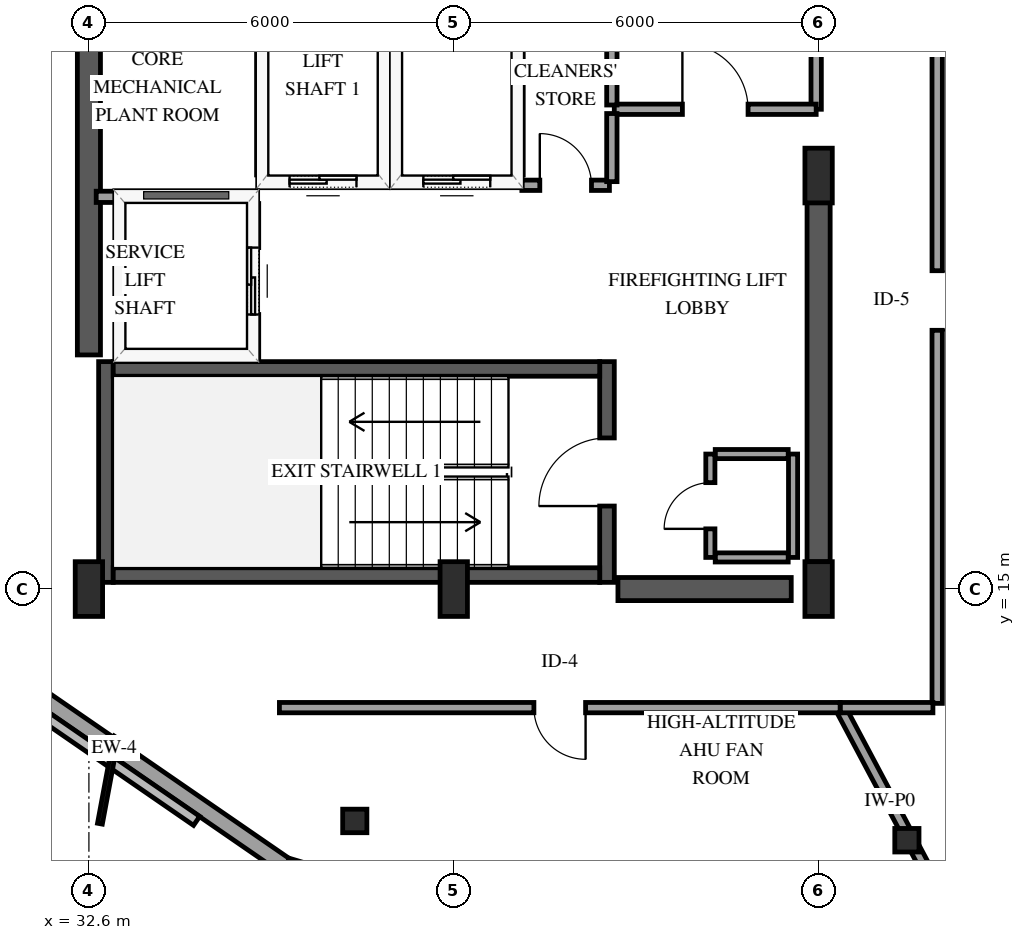
"""IFC4 building model, lengths in metres.
Left out: names, types, materials, properties, quantities, classifications, styles, units other than length and angle.
Written with IfcOpenShell. Run it as: python <this file> out.ifc"""

import sys

from ifc_helpers import new_model, si_unit, direction, frame, frame_2d, origin, origin_2d, place, context, subcontext, project, spatial, rectangle, i_section, extrude, element, fill, save


model = new_model("IFC4")
c1 = context("Model", 3, precision=1e-05, world=origin(), true_north=direction((0.0, 1.0)))
c2 = subcontext(c1, "Body", "Model", "MODEL_VIEW")
j1 = project(units=[si_unit("LENGTHUNIT", "METRE"), si_unit("PLANEANGLEUNIT", "RADIAN")], contexts=[c1])
p1 = place(None, origin())
s1 = spatial("IfcSite", under=j1, at=p1, CompositionType="ELEMENT")
p2 = place(p1, origin())
s2 = spatial("IfcBuilding", under=s1, at=p2, CompositionType="ELEMENT")
p3 = place(p2, frame((0.0, 0.0, 305.65)))
s3 = spatial("IfcBuildingStorey", under=s2, at=p3, CompositionType="ELEMENT", Elevation=305.65)
p4 = place(p3, frame((32.88, 15.11, 0.0), z_axis=(0.0, 0.0, 1.0), x_axis=(0.0, 1.0, 0.0)))
e1 = element("IfcWall", 1, at=p4, inside=s3, PredefinedType="SHEAR", context=c2, shape_type="SweptSolid", body=[
    extrude(rectangle(XDim=3.63, YDim=0.24, at=frame_2d((1.815, 0.0))), origin(), (0.0, 0.0, 1.0), 4.2),
])
p5 = place(p3, frame((41.12, 15.11, 0.0), z_axis=(0.0, 0.0, 1.0), x_axis=(0.0, 1.0, 0.0)))
e2 = element("IfcWall", 2, at=p5, inside=s3, PredefinedType="SHEAR", context=c2, shape_type="SweptSolid", body=[
    extrude(rectangle(XDim=3.63, YDim=0.24, at=frame_2d((1.815, 0.0))), origin(), (0.0, 0.0, 1.0), 4.2),
])
p6 = place(p5, frame((1.255, 0.0, 0.0)))
e3 = element("IfcOpeningElement", 3, at=p6, cuts=e2, PredefinedType="OPENING", context=c2, shape_type="SweptSolid", body=[
    extrude(rectangle(XDim=1.12, YDim=2.15, at=frame_2d((0.56, 1.075))), frame((0.0, 0.13, 0.0), z_axis=(0.0, -1.0, 0.0), x_axis=(1.0, 0.0, 0.0)), (0.0, 0.0, 1.0), 0.26),
])
for number, where, z_axis, x_axis in (
    (4, (33.0, 15.23, 0.0), (0.0, 0.0, 1.0), (1.0, 0.0, 0.0)),
    (5, (33.0, 18.62, 0.0), (0.0, 0.0, 1.0), (1.0, 0.0, 0.0)),
):
    element("IfcWall", number, at=place(p3, frame(where, z_axis=z_axis, x_axis=x_axis)), inside=s3, PredefinedType="SHEAR", context=c2, shape_type="SweptSolid", body=[
        extrude(rectangle(XDim=8.0, YDim=0.24, at=frame_2d((4.0, 0.0))), origin(), (0.0, 0.0, 1.0), 4.2),
    ])
p7 = place(p3, frame((32.6, 18.85, 0.0), z_axis=(0.0, 0.0, 1.0), x_axis=(0.0, 1.0, 0.0)))
e6 = element("IfcWall", 6, at=p7, inside=s3, PredefinedType="SHEAR", context=c2, shape_type="SweptSolid", body=[
    extrude(rectangle(XDim=12.3, YDim=0.38, at=frame_2d((6.15, 0.0))), origin(), (0.0, 0.0, 1.0), 4.2),
])
p8 = place(p3, frame((41.3, 15.0, 0.0), z_axis=(0.0, 0.0, 1.0), x_axis=(1.0, 0.0, 0.0)))
e7 = element("IfcWall", 7, at=p8, inside=s3, PredefinedType="SHEAR", context=c2, shape_type="SweptSolid", body=[
    extrude(rectangle(XDim=2.85, YDim=0.38, at=frame_2d((1.425, 0.0))), origin(), (0.0, 0.0, 1.0), 4.2),
])
p9 = place(p3, frame((44.6, 15.45, 0.0), z_axis=(0.0, 0.0, 1.0), x_axis=(0.0, 1.0, 0.0)))
e8 = element("IfcWall", 8, at=p9, inside=s3, PredefinedType="SHEAR", context=c2, shape_type="SweptSolid", body=[
    extrude(rectangle(XDim=6.35, YDim=0.38, at=frame_2d((3.175, 0.0))), origin(), (0.0, 0.0, 1.0), 4.2),
])
for number, where, z_axis, x_axis in (
    (9, (32.6, 15.0, 0.0), (0.0, 0.0, 1.0), (1.0, 0.0, 0.0)),
    (10, (38.6, 15.0, 0.0), (0.0, 0.0, 1.0), (1.0, 0.0, 0.0)),
    (11, (44.6, 15.0, 0.0), (0.0, 0.0, 1.0), (1.0, 0.0, 0.0)),
    (12, (44.6, 21.8, 0.0), (0.0, 0.0, 1.0), (1.0, 0.0, 0.0)),
):
    element("IfcColumn", number, at=place(p3, frame(where, z_axis=z_axis, x_axis=x_axis)), inside=s3, PredefinedType="PILASTER", context=c2, shape_type="SweptSolid", body=[
        extrude(rectangle(XDim=0.45, YDim=0.9, at=origin_2d()), origin(), (0.0, 0.0, 1.0), 4.2),
    ])
for number, where, z_axis, x_axis in (
    (13, (36.972, 11.187, 0.0), (0.0, 0.0, 1.0), (1.0, 0.0, 0.0)),
    (14, (46.052, 10.869, 0.0), (0.0, 0.0, 1.0), (1.0, 0.0, 0.0)),
):
    element("IfcColumn", number, at=place(p3, frame(where, z_axis=z_axis, x_axis=x_axis)), inside=s3, PredefinedType="COLUMN", context=c2, shape_type="SweptSolid", body=[
        extrude(i_section(OverallWidth=0.398, OverallDepth=0.387, WebThickness=0.021, FlangeThickness=0.033, FilletRadius=0.038, at=origin_2d()), origin(), (0.0, 0.0, 1.0), 4.2),
    ])
p10 = place(p3, frame((35.827, 10.452, 0.0), z_axis=(0.0, 0.0, 1.0), x_axis=(0.958527849857, -0.284998879029, 0.0)))
e15 = element("IfcWall", 15, at=p10, inside=s3, PredefinedType="SOLIDWALL", context=c2, shape_type="SweptSolid", body=[
    extrude(rectangle(XDim=2.967, YDim=0.27, at=frame_2d((1.483, 0.0))), origin(), (0.0, 0.0, 1.0), 3.195),
])
p11 = place(p3, frame((30.201, 14.328, 0.0), z_axis=(0.0, 0.0, 1.0), x_axis=(0.823525410079, -0.567279383509, 0.0)))
e16 = element("IfcWall", 16, at=p11, inside=s3, PredefinedType="SOLIDWALL", context=c2, shape_type="SweptSolid", body=[
    extrude(rectangle(XDim=6.831, YDim=0.27, at=frame_2d((3.416, 0.0))), origin(), (0.0, 0.0, 1.0), 3.195),
])
p12 = place(p3, frame((45.499, 9.779, 0.0), z_axis=(0.0, 0.0, 1.0), x_axis=(0.942990333583, 0.332820117735, 0.0)))
e17 = element("IfcWall", 17, at=p12, inside=s3, PredefinedType="SOLIDWALL", context=c2, shape_type="SweptSolid", body=[
    extrude(rectangle(XDim=2.967, YDim=0.27, at=frame_2d((1.483, 0.0))), origin(), (0.0, 0.0, 1.0), 3.195),
])
p13 = place(p3, frame((35.45, 21.7, 0.0), z_axis=(0.0, 0.0, 1.0), x_axis=(1.0, 0.0, 0.0)))
e18 = element("IfcWall", 18, at=p13, inside=s3, PredefinedType="SOLIDWALL", context=c2, shape_type="SweptSolid", body=[
    extrude(rectangle(XDim=2.0, YDim=0.185, at=frame_2d((1.0, 0.0))), origin(), (0.0, 0.0, 1.0), 3.895),
])
p14 = place(p13, frame((0.45, 0.0, 0.0)))
e19 = element("IfcOpeningElement", 19, at=p14, cuts=e18, PredefinedType="OPENING", context=c2, shape_type="SweptSolid", body=[
    extrude(rectangle(XDim=1.1, YDim=2.15, at=frame_2d((0.55, 1.075))), frame((0.0, 0.103, 0.0), z_axis=(0.0, -1.0, 0.0), x_axis=(1.0, 0.0, 0.0)), (0.0, 0.0, 1.0), 0.205),
])
for number, where, z_axis, x_axis in (
    (20, (35.45, 21.81, 0.0), (0.0, 0.0, 1.0), (0.0, 1.0, 0.0)),
    (21, (37.45, 21.81, 0.0), (0.0, 0.0, 1.0), (0.0, 1.0, 0.0)),
):
    element("IfcWall", number, at=place(p3, frame(where, z_axis=z_axis, x_axis=x_axis)), inside=s3, PredefinedType="SOLIDWALL", context=c2, shape_type="SweptSolid", body=[
        extrude(rectangle(XDim=2.38, YDim=0.185, at=frame_2d((1.19, 0.0))), origin(), (0.0, 0.0, 1.0), 3.895),
    ])
p15 = place(p3, frame((37.65, 21.7, 0.0), z_axis=(0.0, 0.0, 1.0), x_axis=(1.0, 0.0, 0.0)))
e22 = element("IfcWall", 22, at=p15, inside=s3, PredefinedType="SOLIDWALL", context=c2, shape_type="SweptSolid", body=[
    extrude(rectangle(XDim=2.0, YDim=0.185, at=frame_2d((1.0, 0.0))), origin(), (0.0, 0.0, 1.0), 3.895),
])
p16 = place(p15, frame((0.45, 0.0, 0.0)))
e23 = element("IfcOpeningElement", 23, at=p16, cuts=e22, PredefinedType="OPENING", context=c2, shape_type="SweptSolid", body=[
    extrude(rectangle(XDim=1.1, YDim=2.15, at=frame_2d((0.55, 1.075))), frame((0.0, 0.103, 0.0), z_axis=(0.0, -1.0, 0.0), x_axis=(1.0, 0.0, 0.0)), (0.0, 0.0, 1.0), 0.205),
])
p17 = place(p3, frame((39.65, 21.81, 0.0), z_axis=(0.0, 0.0, 1.0), x_axis=(0.0, 1.0, 0.0)))
e24 = element("IfcWall", 24, at=p17, inside=s3, PredefinedType="SOLIDWALL", context=c2, shape_type="SweptSolid", body=[
    extrude(rectangle(XDim=2.38, YDim=0.185, at=frame_2d((1.19, 0.0))), origin(), (0.0, 0.0, 1.0), 3.895),
])
p18 = place(p3, frame((32.72, 21.45, 0.0), z_axis=(0.0, 0.0, 1.0), x_axis=(1.0, 0.0, 0.0)))
e25 = element("IfcWall", 25, at=p18, inside=s3, PredefinedType="SOLIDWALL", context=c2, shape_type="SweptSolid", body=[
    extrude(rectangle(XDim=2.58, YDim=0.185, at=frame_2d((1.29, 0.0))), origin(), (0.0, 0.0, 1.0), 3.895),
])
p19 = place(p3, frame((35.3, 18.79, 0.0), z_axis=(0.0, 0.0, 1.0), x_axis=(0.0, 1.0, 0.0)))
e26 = element("IfcWall", 26, at=p19, inside=s3, PredefinedType="SOLIDWALL", context=c2, shape_type="SweptSolid", body=[
    extrude(rectangle(XDim=2.55, YDim=0.185, at=frame_2d((1.275, 0.0))), origin(), (0.0, 0.0, 1.0), 3.895),
])
p20 = place(p19, frame((0.725, 0.0, 0.0)))
e27 = element("IfcOpeningElement", 27, at=p20, cuts=e26, PredefinedType="OPENING", context=c2, shape_type="SweptSolid", body=[
    extrude(rectangle(XDim=1.1, YDim=2.15, at=frame_2d((0.55, 1.075))), frame((0.0, 0.103, 0.0), z_axis=(0.0, -1.0, 0.0), x_axis=(1.0, 0.0, 0.0)), (0.0, 0.0, 1.0), 0.205),
])
for number, where, z_axis, x_axis in (
    (28, (42.9, 15.52, 0.0), (0.0, 0.0, 1.0), (1.0, 0.0, 0.0)),
    (29, (42.9, 17.22, 0.0), (0.0, 0.0, 1.0), (1.0, 0.0, 0.0)),
):
    element("IfcWall", number, at=place(p3, frame(where, z_axis=z_axis, x_axis=x_axis)), inside=s3, PredefinedType="PARTITIONING", context=c2, shape_type="SweptSolid", body=[
        extrude(rectangle(XDim=1.2, YDim=0.15, at=frame_2d((0.6, 0.0))), origin(), (0.0, 0.0, 1.0), 3.895),
    ])
p21 = place(p3, frame((44.18, 15.52, 0.0), z_axis=(0.0, 0.0, 1.0), x_axis=(0.0, 1.0, 0.0)))
e30 = element("IfcWall", 30, at=p21, inside=s3, PredefinedType="PARTITIONING", context=c2, shape_type="SweptSolid", body=[
    extrude(rectangle(XDim=1.7, YDim=0.15, at=frame_2d((0.85, 0.0))), origin(), (0.0, 0.0, 1.0), 3.895),
])
p22 = place(p3, frame((42.82, 15.52, 0.0), z_axis=(0.0, 0.0, 1.0), x_axis=(0.0, 1.0, 0.0)))
e31 = element("IfcWall", 31, at=p22, inside=s3, PredefinedType="PARTITIONING", context=c2, shape_type="SweptSolid", body=[
    extrude(rectangle(XDim=1.7, YDim=0.15, at=frame_2d((0.85, 0.0))), origin(), (0.0, 0.0, 1.0), 3.895),
])
p23 = place(p22, frame((0.47, 0.0, 0.0)))
e32 = element("IfcOpeningElement", 32, at=p23, cuts=e31, PredefinedType="OPENING", context=c2, shape_type="SweptSolid", body=[
    extrude(rectangle(XDim=0.76, YDim=2.0, at=frame_2d((0.38, 1.0))), frame((0.0, 0.085, 0.0), z_axis=(0.0, -1.0, 0.0), x_axis=(1.0, 0.0, 0.0)), (0.0, 0.0, 1.0), 0.17),
])
p24 = place(p3, frame((46.55, 26.401, 0.0), z_axis=(0.0, 0.0, 1.0), x_axis=(0.0, -1.0, 0.0)))
e33 = element("IfcWall", 33, at=p24, inside=s3, PredefinedType="PARTITIONING", context=c2, shape_type="SweptSolid", body=[
    extrude(rectangle(XDim=13.281, YDim=0.17, at=frame_2d((6.64, 0.0))), origin(), (0.0, 0.0, 1.0), 3.895),
])
p25 = place(p24, frame((6.166, 0.0, 0.0)))
e34 = element("IfcOpeningElement", 34, at=p25, cuts=e33, PredefinedType="OPENING", context=c2, shape_type="SweptSolid", body=[
    extrude(rectangle(XDim=0.98, YDim=2.15, at=frame_2d((0.49, 1.075))), frame((0.0, 0.095, 0.0), z_axis=(0.0, -1.0, 0.0), x_axis=(1.0, 0.0, 0.0)), (0.0, 0.0, 1.0), 0.19),
])
p26 = place(p3, frame((44.56, 29.8, 0.0), z_axis=(0.0, 0.0, 1.0), x_axis=(0.0, -1.0, 0.0)))
e35 = element("IfcWall", 35, at=p26, inside=s3, PredefinedType="PARTITIONING", context=c2, shape_type="SweptSolid", body=[
    extrude(rectangle(XDim=6.91, YDim=0.17, at=frame_2d((3.455, 0.0))), origin(), (0.0, 0.0, 1.0), 2.935),
])
p27 = place(p26, frame((2.915, 0.0, 0.0)))
e36 = element("IfcOpeningElement", 36, at=p27, cuts=e35, PredefinedType="OPENING", context=c2, shape_type="SweptSolid", body=[
    extrude(rectangle(XDim=1.08, YDim=2.15, at=frame_2d((0.54, 1.075))), frame((0.0, 0.095, 0.0), z_axis=(0.0, -1.0, 0.0), x_axis=(1.0, 0.0, 0.0)), (0.0, 0.0, 1.0), 0.19),
])
p28 = place(p3, frame((46.586, 9.979, 0.0), z_axis=(0.0, 0.0, 1.0), x_axis=(-0.469232216807, 0.883074813767, 0.0)))
e37 = element("IfcWall", 37, at=p28, inside=s3, PredefinedType="PARTITIONING", context=c2, shape_type="SweptSolid", body=[
    extrude(rectangle(XDim=3.478, YDim=0.17, at=frame_2d((1.739, 0.0))), origin(), (0.0, 0.0, 1.0), 3.19),
])
p29 = place(p3, frame((41.24, 22.89, 0.0), z_axis=(0.0, 0.0, 1.0), x_axis=(1.0, 0.0, 0.0)))
e38 = element("IfcWall", 38, at=p29, inside=s3, PredefinedType="PARTITIONING", context=c2, shape_type="SweptSolid", body=[
    extrude(rectangle(XDim=3.32, YDim=0.17, at=frame_2d((1.66, 0.0))), origin(), (0.0, 0.0, 1.0), 3.895),
])
p30 = place(p29, frame((1.12, 0.0, 0.0)))
e39 = element("IfcOpeningElement", 39, at=p30, cuts=e38, PredefinedType="OPENING", context=c2, shape_type="SweptSolid", body=[
    extrude(rectangle(XDim=1.08, YDim=2.15, at=frame_2d((0.54, 1.075))), frame((0.0, 0.095, 0.0), z_axis=(0.0, -1.0, 0.0), x_axis=(1.0, 0.0, 0.0)), (0.0, 0.0, 1.0), 0.19),
])
p31 = place(p3, frame((46.48, 13.05, 0.0), z_axis=(0.0, 0.0, 1.0), x_axis=(-1.0, 0.0, 0.0)))
e40 = element("IfcWall", 40, at=p31, inside=s3, PredefinedType="PARTITIONING", context=c2, shape_type="SweptSolid", body=[
    extrude(rectangle(XDim=1.526, YDim=0.17, at=frame_2d((0.763, 0.0))), origin(), (0.0, 0.0, 1.0), 3.895),
])
p32 = place(p3, frame((41.2, 22.96, 0.0), z_axis=(0.0, 0.0, 1.0), x_axis=(0.0, 1.0, 0.0)))
e41 = element("IfcWall", 41, at=p32, inside=s3, PredefinedType="PARTITIONING", context=c2, shape_type="SweptSolid", body=[
    extrude(rectangle(XDim=1.46, YDim=0.17, at=frame_2d((0.73, 0.0))), origin(), (0.0, 0.0, 1.0), 3.895),
])
p33 = place(p3, frame((39.72, 21.64, 0.0), z_axis=(0.0, 0.0, 1.0), x_axis=(1.0, 0.0, 0.0)))
e42 = element("IfcWall", 42, at=p33, inside=s3, PredefinedType="PARTITIONING", context=c2, shape_type="SweptSolid", body=[
    extrude(rectangle(XDim=1.44, YDim=0.17, at=frame_2d((0.72, 0.0))), origin(), (0.0, 0.0, 1.0), 3.895),
])
p34 = place(p33, frame((0.295, 0.0, 0.0)))
e43 = element("IfcOpeningElement", 43, at=p34, cuts=e42, PredefinedType="OPENING", context=c2, shape_type="SweptSolid", body=[
    extrude(rectangle(XDim=0.85, YDim=2.1, at=frame_2d((0.425, 1.05))), frame((0.0, 0.095, 0.0), z_axis=(0.0, -1.0, 0.0), x_axis=(1.0, 0.0, 0.0)), (0.0, 0.0, 1.0), 0.19),
])
p35 = place(p3, frame((41.2, 21.7, 0.0), z_axis=(0.0, 0.0, 1.0), x_axis=(0.0, 1.0, 0.0)))
e44 = element("IfcWall", 44, at=p35, inside=s3, PredefinedType="PARTITIONING", context=c2, shape_type="SweptSolid", body=[
    extrude(rectangle(XDim=1.12, YDim=0.17, at=frame_2d((0.56, 0.0))), origin(), (0.0, 0.0, 1.0), 3.895),
])
p36 = place(p3, frame((44.954, 13.05, 0.0), z_axis=(0.0, 0.0, 1.0), x_axis=(-1.0, 0.0, 0.0)))
e45 = element("IfcWall", 45, at=p36, inside=s3, PredefinedType="PARTITIONING", context=c2, shape_type="SweptSolid", body=[
    extrude(rectangle(XDim=9.221, YDim=0.17, at=frame_2d((4.611, 0.0))), origin(), (0.0, 0.0, 1.0), 3.895),
])
p37 = place(p36, frame((4.186, 0.0, 0.0)))
e46 = element("IfcOpeningElement", 46, at=p37, cuts=e45, PredefinedType="OPENING", context=c2, shape_type="SweptSolid", body=[
    extrude(rectangle(XDim=0.85, YDim=2.1, at=frame_2d((0.425, 1.05))), frame((0.0, 0.095, 0.0), z_axis=(0.0, -1.0, 0.0), x_axis=(1.0, 0.0, 0.0)), (0.0, 0.0, 1.0), 0.19),
])
p38 = place(p14, origin())
e47 = element("IfcDoor", 47, at=p38, inside=s3, OperationType="SLIDING_TO_LEFT", PredefinedType="DOOR", context=c2, shape_type="SweptSolid", body=[
    extrude(rectangle(XDim=1.1, YDim=2.15, at=frame_2d((0.55, 1.075))), frame((0.0, 0.025, 0.0), z_axis=(0.0, -1.0, 0.0), x_axis=(1.0, 0.0, 0.0)), (0.0, 0.0, 1.0), 0.05),
])
fill(e19, e47)
p39 = place(p16, origin())
e48 = element("IfcDoor", 48, at=p39, inside=s3, OperationType="SLIDING_TO_LEFT", PredefinedType="DOOR", context=c2, shape_type="SweptSolid", body=[
    extrude(rectangle(XDim=1.1, YDim=2.15, at=frame_2d((0.55, 1.075))), frame((0.0, 0.025, 0.0), z_axis=(0.0, -1.0, 0.0), x_axis=(1.0, 0.0, 0.0)), (0.0, 0.0, 1.0), 0.05),
])
fill(e23, e48)
p40 = place(p20, origin())
e49 = element("IfcDoor", 49, at=p40, inside=s3, OperationType="SLIDING_TO_LEFT", PredefinedType="DOOR", context=c2, shape_type="SweptSolid", body=[
    extrude(rectangle(XDim=1.1, YDim=2.15, at=frame_2d((0.55, 1.075))), frame((0.0, 0.025, 0.0), z_axis=(0.0, -1.0, 0.0), x_axis=(1.0, 0.0, 0.0)), (0.0, 0.0, 1.0), 0.05),
])
fill(e27, e49)
p41 = place(p6, origin())
e50 = element("IfcDoor", 50, at=p41, inside=s3, OperationType="SINGLE_SWING_LEFT", PredefinedType="DOOR", context=c2, shape_type="SweptSolid", body=[
    extrude(rectangle(XDim=1.12, YDim=2.15, at=frame_2d((0.56, 1.075))), frame((0.0, 0.025, 0.0), z_axis=(0.0, -1.0, 0.0), x_axis=(1.0, 0.0, 0.0)), (0.0, 0.0, 1.0), 0.05),
])
fill(e3, e50)
p42 = place(p23, origin())
e51 = element("IfcDoor", 51, at=p42, inside=s3, OperationType="SINGLE_SWING_LEFT", PredefinedType="TRAPDOOR", context=c2, shape_type="SweptSolid", body=[
    extrude(rectangle(XDim=0.76, YDim=2.0, at=frame_2d((0.38, 1.0))), frame((0.0, 0.025, 0.0), z_axis=(0.0, -1.0, 0.0), x_axis=(1.0, 0.0, 0.0)), (0.0, 0.0, 1.0), 0.05),
])
fill(e32, e51)
p43 = place(p25, origin())
e52 = element("IfcDoor", 52, at=p43, inside=s3, OperationType="SINGLE_SWING_RIGHT", PredefinedType="DOOR", context=c2, shape_type="SweptSolid", body=[
    extrude(rectangle(XDim=0.98, YDim=2.15, at=frame_2d((0.49, 1.075))), frame((0.0, 0.025, 0.0), z_axis=(0.0, -1.0, 0.0), x_axis=(1.0, 0.0, 0.0)), (0.0, 0.0, 1.0), 0.05),
])
fill(e34, e52)
p44 = place(p30, origin())
e53 = element("IfcDoor", 53, at=p44, inside=s3, OperationType="SINGLE_SWING_LEFT", PredefinedType="DOOR", context=c2, shape_type="SweptSolid", body=[
    extrude(rectangle(XDim=1.08, YDim=2.15, at=frame_2d((0.54, 1.075))), frame((0.0, 0.025, 0.0), z_axis=(0.0, -1.0, 0.0), x_axis=(1.0, 0.0, 0.0)), (0.0, 0.0, 1.0), 0.05),
])
fill(e39, e53)
p45 = place(p34, origin())
e54 = element("IfcDoor", 54, at=p45, inside=s3, OperationType="SINGLE_SWING_LEFT", PredefinedType="DOOR", context=c2, shape_type="SweptSolid", body=[
    extrude(rectangle(XDim=0.85, YDim=2.1, at=frame_2d((0.425, 1.05))), frame((0.0, 0.025, 0.0), z_axis=(0.0, -1.0, 0.0), x_axis=(1.0, 0.0, 0.0)), (0.0, 0.0, 1.0), 0.05),
])
fill(e43, e54)
p46 = place(p37, origin())
e55 = element("IfcDoor", 55, at=p46, inside=s3, OperationType="SINGLE_SWING_LEFT", PredefinedType="DOOR", context=c2, shape_type="SweptSolid", body=[
    extrude(rectangle(XDim=0.85, YDim=2.1, at=frame_2d((0.425, 1.05))), frame((0.0, 0.025, 0.0), z_axis=(0.0, -1.0, 0.0), x_axis=(1.0, 0.0, 0.0)), (0.0, 0.0, 1.0), 0.05),
])
fill(e46, e55)
save(model, sys.argv[1])
